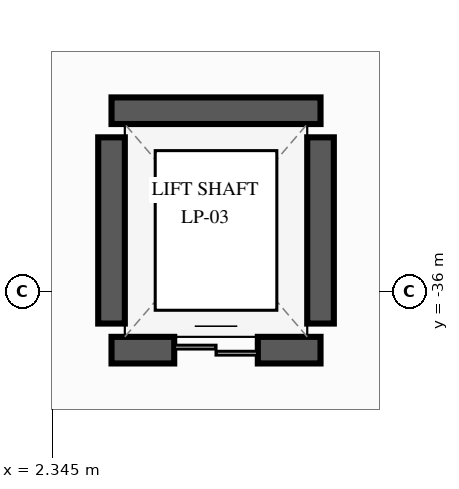
"""IFC4 building model, lengths in metres.
Left out: names, types, materials, properties, quantities, classifications, styles, units other than length and angle.
Written with IfcOpenShell. Run it as: python <this file> out.ifc"""

import sys

from ifc_helpers import new_model, si_unit, direction, frame, frame_2d, origin, place, context, subcontext, project, spatial, rectangle, extrude, element, fill, save


model = new_model("IFC4")
c1 = context("Model", 3, precision=1e-05, world=origin(), true_north=direction((0.0, 1.0)))
c2 = subcontext(c1, "Body", "Model", "MODEL_VIEW")
j1 = project(units=[si_unit("LENGTHUNIT", "METRE"), si_unit("PLANEANGLEUNIT", "RADIAN")], contexts=[c1])
p1 = place(None, origin())
s1 = spatial("IfcSite", under=j1, at=p1, CompositionType="ELEMENT")
p2 = place(p1, origin())
s2 = spatial("IfcBuilding", under=s1, at=p2, CompositionType="ELEMENT")
p3 = place(p2, frame((0.0, 0.0, -6.0)))
s3 = spatial("IfcBuildingStorey", under=s2, at=p3, CompositionType="ELEMENT", Elevation=-6.0)
p4 = place(p3, frame((3.125, -36.775, 0.0), z_axis=(0.0, 0.0, 1.0), x_axis=(1.0, 0.0, 0.0)))
e1 = element("IfcWall", 1, at=p4, inside=s3, PredefinedType="SHEAR", context=c2, shape_type="SweptSolid", body=[
    extrude(rectangle(XDim=2.75, YDim=0.35, at=frame_2d((1.375, 0.0))), origin(), (0.0, 0.0, 1.0), 5.7),
])
p5 = place(p4, frame((0.825, 0.0, 0.0)))
e2 = element("IfcOpeningElement", 2, at=p5, cuts=e1, PredefinedType="OPENING", context=c2, shape_type="SweptSolid", body=[
    extrude(rectangle(XDim=1.1, YDim=2.2, at=frame_2d((0.55, 1.1))), frame((0.0, 0.185, 0.0), z_axis=(0.0, -1.0, 0.0), x_axis=(1.0, 0.0, 0.0)), (0.0, 0.0, 1.0), 0.37),
])
p6 = place(p3, frame((5.875, -33.625, 0.0), z_axis=(0.0, 0.0, 1.0), x_axis=(-1.0, 0.0, 0.0)))
e3 = element("IfcWall", 3, at=p6, inside=s3, PredefinedType="SHEAR", context=c2, shape_type="SweptSolid", body=[
    extrude(rectangle(XDim=2.75, YDim=0.35, at=frame_2d((1.375, 0.0))), origin(), (0.0, 0.0, 1.0), 5.7),
])
for number, where, z_axis, x_axis in (
    (4, (3.125, -36.425, 0.0), (0.0, 0.0, 1.0), (0.0, 1.0, 0.0)),
    (5, (5.875, -36.425, 0.0), (0.0, 0.0, 1.0), (0.0, 1.0, 0.0)),
):
    element("IfcWall", number, at=place(p3, frame(where, z_axis=z_axis, x_axis=x_axis)), inside=s3, PredefinedType="SHEAR", context=c2, shape_type="SweptSolid", body=[
        extrude(rectangle(XDim=2.45, YDim=0.35, at=frame_2d((1.225, 0.0))), origin(), (0.0, 0.0, 1.0), 5.7),
    ])
p7 = place(p5, origin())
e6 = element("IfcDoor", 6, at=p7, inside=s3, OperationType="DOUBLE_DOOR_SLIDING", PredefinedType="DOOR", context=c2, shape_type="SweptSolid", body=[
    extrude(rectangle(XDim=1.1, YDim=2.2, at=frame_2d((0.55, 1.1))), frame((0.0, 0.025, 0.0), z_axis=(0.0, -1.0, 0.0), x_axis=(1.0, 0.0, 0.0)), (0.0, 0.0, 1.0), 0.05),
])
fill(e2, e6)
save(model, sys.argv[1])
